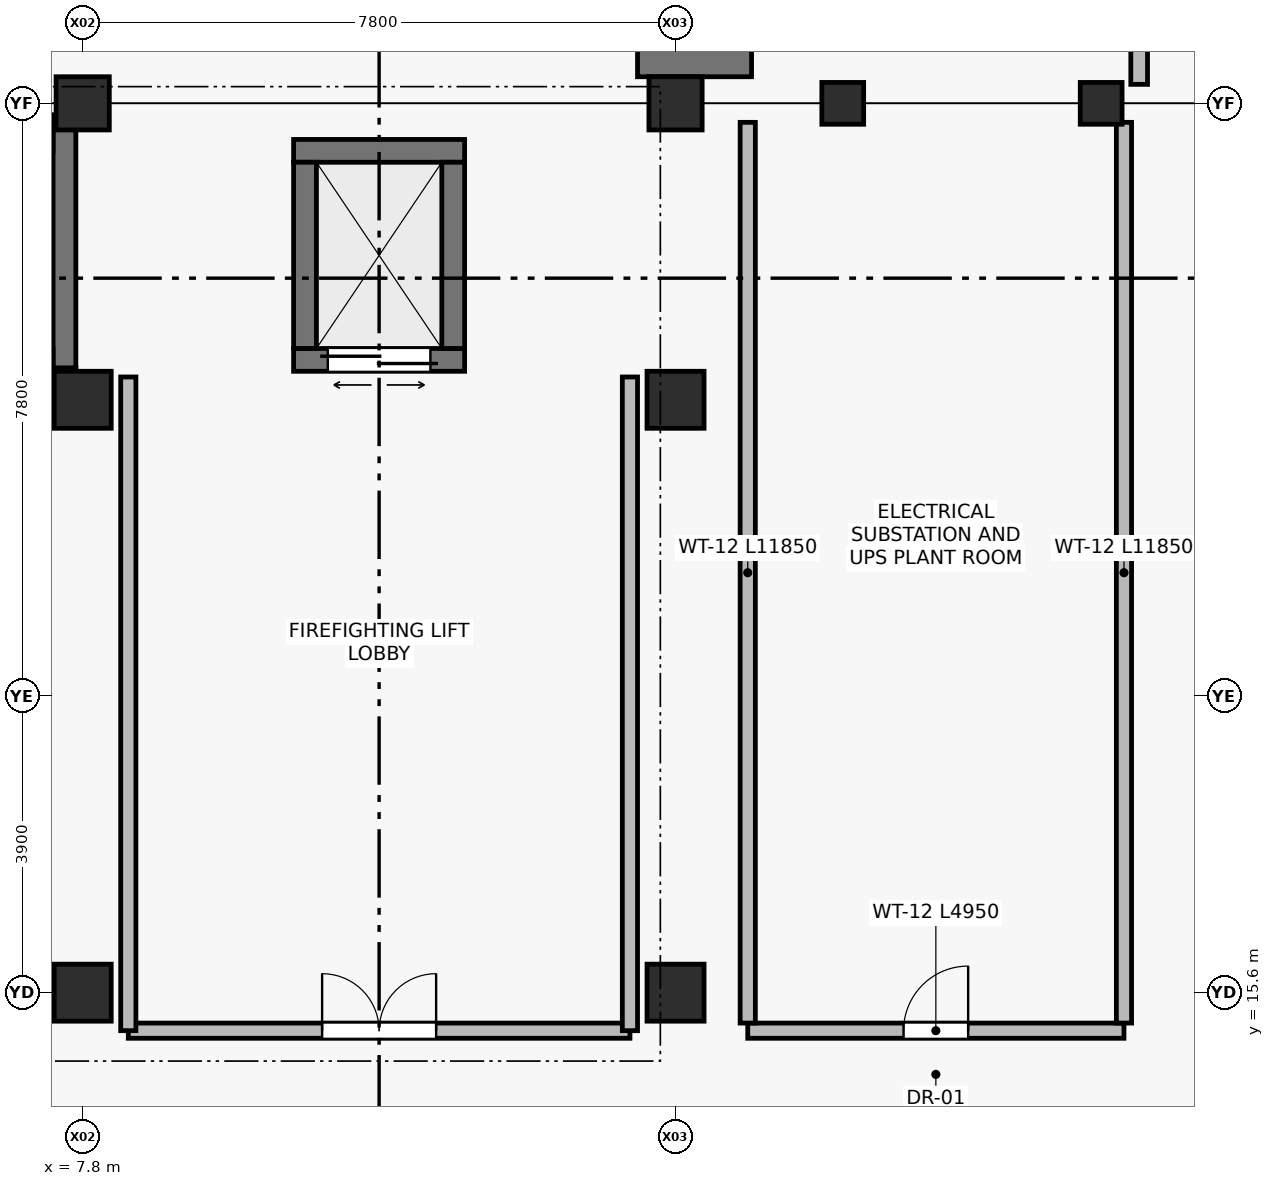
"""IFC4 building model, lengths in metres.
Left out: names, types, materials, properties, quantities, classifications, styles, units other than length and angle.
Written with IfcOpenShell. Run it as: python <this file> out.ifc"""

import sys

from ifc_helpers import new_model, si_unit, direction, frame, frame_2d, origin, origin_2d, place, context, subcontext, project, spatial, rectangle, extrude, element, fill, save


model = new_model("IFC4")
c1 = context("Model", 3, precision=1e-05, world=origin(), true_north=direction((0.0, 1.0)))
c2 = subcontext(c1, "Body", "Model", "MODEL_VIEW")
j1 = project(units=[si_unit("LENGTHUNIT", "METRE"), si_unit("PLANEANGLEUNIT", "RADIAN")], contexts=[c1])
p1 = place(None, origin())
s1 = spatial("IfcSite", under=j1, at=p1, CompositionType="ELEMENT")
p2 = place(p1, origin())
s2 = spatial("IfcBuilding", under=s1, at=p2, CompositionType="ELEMENT")
p3 = place(p2, frame((0.0, 0.0, -4.5)))
s3 = spatial("IfcBuildingStorey", under=s2, at=p3, CompositionType="ELEMENT", Elevation=-4.5)
for number, where, z_axis, x_axis in (
    (1, (7.8, 27.3, 0.0), (0.0, 0.0, 1.0), (1.0, 0.0, 0.0)),
    (2, (15.6, 27.3, 0.0), (0.0, 0.0, 1.0), (1.0, 0.0, 0.0)),
):
    element("IfcColumn", number, at=place(p3, frame(where, z_axis=z_axis, x_axis=x_axis)), inside=s3, PredefinedType="COLUMN", context=c2, shape_type="SweptSolid", body=[
        extrude(rectangle(XDim=0.7, YDim=0.7, at=origin_2d()), origin(), (0.0, 0.0, 1.0), 4.5),
    ])
for number, where, z_axis, x_axis in (
    (3, (7.8, 15.6, 0.0), (0.0, 0.0, 1.0), (1.0, 0.0, 0.0)),
    (4, (7.8, 23.4, 0.0), (0.0, 0.0, 1.0), (1.0, 0.0, 0.0)),
    (5, (15.6, 15.6, 0.0), (0.0, 0.0, 1.0), (1.0, 0.0, 0.0)),
    (6, (15.6, 23.4, 0.0), (0.0, 0.0, 1.0), (1.0, 0.0, 0.0)),
):
    element("IfcColumn", number, at=place(p3, frame(where, z_axis=z_axis, x_axis=x_axis)), inside=s3, PredefinedType="COLUMN", context=c2, shape_type="SweptSolid", body=[
        extrude(rectangle(XDim=0.75, YDim=0.75, at=origin_2d()), origin(), (0.0, 0.0, 1.0), 4.5),
    ])
for number, where, z_axis, x_axis in (
    (7, (17.8, 27.3, 0.0), (0.0, 0.0, 1.0), (1.0, 0.0, 0.0)),
    (8, (21.2, 27.3, 0.0), (0.0, 0.0, 1.0), (1.0, 0.0, 0.0)),
):
    element("IfcColumn", number, at=place(p3, frame(where, z_axis=z_axis, x_axis=x_axis)), inside=s3, PredefinedType="COLUMN", context=c2, shape_type="SweptSolid", body=[
        extrude(rectangle(XDim=0.55, YDim=0.55, at=origin_2d()), origin(), (0.0, 0.0, 1.0), 4.5),
    ])
for number, where, z_axis, x_axis in (
    (9, (7.21, 23.87, 0.0), (0.0, 0.0, 1.0), (1.0, 0.0, 0.0)),
    (10, (7.21, 26.87, 0.0), (0.0, 0.0, 1.0), (1.0, 0.0, 0.0)),
):
    element("IfcColumn", number, at=place(p3, frame(where, z_axis=z_axis, x_axis=x_axis)), inside=s3, PredefinedType="COLUMN", context=c2, shape_type="SweptSolid", body=[
        extrude(rectangle(XDim=0.4, YDim=0.4, at=origin_2d()), origin(), (0.0, 0.0, 1.0), 4.5),
    ])
p4 = place(p3, frame((0.15, 23.67, 0.0), z_axis=(0.0, 0.0, 1.0), x_axis=(1.0, 0.0, 0.0)))
e11 = element("IfcWall", 11, at=p4, inside=s3, PredefinedType="SHEAR", context=c2, shape_type="SweptSolid", body=[
    extrude(rectangle(XDim=7.56, YDim=0.3, at=frame_2d((3.78, 0.0))), origin(), (0.0, 0.0, 1.0), 4.2),
])
p5 = place(p4, frame((0.56, 0.0, 0.0)))
e12 = element("IfcOpeningElement", 12, at=p5, cuts=e11, PredefinedType="OPENING", context=c2, shape_type="SweptSolid", body=[
    extrude(rectangle(XDim=1.4, YDim=2.2, at=frame_2d((0.7, 1.1))), frame((0.0, 0.16, 0.0), z_axis=(0.0, -1.0, 0.0), x_axis=(1.0, 0.0, 0.0)), (0.0, 0.0, 1.0), 0.32),
])
p6 = place(p3, frame((7.56, 23.82, 0.0), z_axis=(0.0, 0.0, 1.0), x_axis=(0.0, 1.0, 0.0)))
e13 = element("IfcWall", 13, at=p6, inside=s3, PredefinedType="SHEAR", context=c2, shape_type="SweptSolid", body=[
    extrude(rectangle(XDim=3.33, YDim=0.3, at=frame_2d((1.665, 0.0))), origin(), (0.0, 0.0, 1.0), 4.2),
])
p7 = place(p3, frame((10.575, 23.925, 0.0), z_axis=(0.0, 0.0, 1.0), x_axis=(1.0, 0.0, 0.0)))
e14 = element("IfcWall", 14, at=p7, inside=s3, PredefinedType="SHEAR", context=c2, shape_type="SweptSolid", body=[
    extrude(rectangle(XDim=2.25, YDim=0.3, at=frame_2d((1.125, 0.0))), origin(), (0.0, 0.0, 1.0), 4.2),
])
p8 = place(p7, frame((0.45, 0.0, 0.0)))
e15 = element("IfcOpeningElement", 15, at=p8, cuts=e14, PredefinedType="OPENING", context=c2, shape_type="SweptSolid", body=[
    extrude(rectangle(XDim=1.35, YDim=2.3, at=frame_2d((0.675, 1.15))), frame((0.0, 0.16, 0.0), z_axis=(0.0, -1.0, 0.0), x_axis=(1.0, 0.0, 0.0)), (0.0, 0.0, 1.0), 0.32),
])
p9 = place(p3, frame((12.825, 26.675, 0.0), z_axis=(0.0, 0.0, 1.0), x_axis=(-1.0, 0.0, 0.0)))
e16 = element("IfcWall", 16, at=p9, inside=s3, PredefinedType="SHEAR", context=c2, shape_type="SweptSolid", body=[
    extrude(rectangle(XDim=2.25, YDim=0.3, at=frame_2d((1.125, 0.0))), origin(), (0.0, 0.0, 1.0), 4.2),
])
for number, where, z_axis, x_axis in (
    (17, (10.725, 26.525, 0.0), (0.0, 0.0, 1.0), (0.0, -1.0, 0.0)),
    (18, (12.675, 24.075, 0.0), (0.0, 0.0, 1.0), (0.0, 1.0, 0.0)),
):
    element("IfcWall", number, at=place(p3, frame(where, z_axis=z_axis, x_axis=x_axis)), inside=s3, PredefinedType="SHEAR", context=c2, shape_type="SweptSolid", body=[
        extrude(rectangle(XDim=2.45, YDim=0.3, at=frame_2d((1.225, 0.0))), origin(), (0.0, 0.0, 1.0), 4.2),
    ])
p10 = place(p3, frame((8.4, 15.1, 0.0), z_axis=(0.0, 0.0, 1.0), x_axis=(1.0, 0.0, 0.0)))
e19 = element("IfcWall", 19, at=p10, inside=s3, PredefinedType="SOLIDWALL", context=c2, shape_type="SweptSolid", body=[
    extrude(rectangle(XDim=6.6, YDim=0.2, at=frame_2d((3.3, 0.0))), origin(), (0.0, 0.0, 1.0), 4.2),
])
p11 = place(p10, frame((2.55, 0.0, 0.0)))
e20 = element("IfcOpeningElement", 20, at=p11, cuts=e19, PredefinedType="OPENING", context=c2, shape_type="SweptSolid", body=[
    extrude(rectangle(XDim=1.5, YDim=2.2, at=frame_2d((0.75, 1.1))), frame((0.0, 0.11, 0.0), z_axis=(0.0, -1.0, 0.0), x_axis=(1.0, 0.0, 0.0)), (0.0, 0.0, 1.0), 0.22),
])
for number, where, z_axis, x_axis in (
    (21, (8.4, 23.7, 0.0), (0.0, 0.0, 1.0), (0.0, -1.0, 0.0)),
    (22, (15.0, 15.1, 0.0), (0.0, 0.0, 1.0), (0.0, 1.0, 0.0)),
):
    element("IfcWall", number, at=place(p3, frame(where, z_axis=z_axis, x_axis=x_axis)), inside=s3, PredefinedType="SOLIDWALL", context=c2, shape_type="SweptSolid", body=[
        extrude(rectangle(XDim=8.6, YDim=0.2, at=frame_2d((4.3, 0.0))), origin(), (0.0, 0.0, 1.0), 4.2),
    ])
p12 = place(p3, frame((16.55, 15.1, 0.0), z_axis=(0.0, 0.0, 1.0), x_axis=(1.0, 0.0, 0.0)))
e23 = element("IfcWall", 23, at=p12, inside=s3, PredefinedType="SOLIDWALL", context=c2, shape_type="SweptSolid", body=[
    extrude(rectangle(XDim=4.95, YDim=0.2, at=frame_2d((2.475, 0.0))), origin(), (0.0, 0.0, 1.0), 4.2),
])
p13 = place(p12, frame((2.05, 0.0, 0.0)))
e24 = element("IfcOpeningElement", 24, at=p13, cuts=e23, PredefinedType="OPENING", context=c2, shape_type="SweptSolid", body=[
    extrude(rectangle(XDim=0.85, YDim=2.1, at=frame_2d((0.425, 1.05))), frame((0.0, 0.11, 0.0), z_axis=(0.0, -1.0, 0.0), x_axis=(1.0, 0.0, 0.0)), (0.0, 0.0, 1.0), 0.22),
])
p14 = place(p3, frame((15.85, 27.65, 0.0), z_axis=(0.0, 0.0, 1.0), x_axis=(0.0, 1.0, 0.0)))
e25 = element("IfcWall", 25, at=p14, inside=s3, PredefinedType="SOLIDWALL", context=c2, shape_type="SweptSolid", body=[
    extrude(rectangle(XDim=7.1, YDim=1.5, at=frame_2d((3.55, 0.0))), origin(), (0.0, 0.0, 1.0), 4.12),
])
p15 = place(p3, frame((21.7, 27.55, 0.0), z_axis=(0.0, 0.0, 1.0), x_axis=(0.0, 1.0, 0.0)))
e26 = element("IfcWall", 26, at=p15, inside=s3, PredefinedType="PARTITIONING", context=c2, shape_type="SweptSolid", body=[
    extrude(rectangle(XDim=19.24, YDim=0.22, at=frame_2d((9.62, 0.0))), origin(), (0.0, 0.0, 1.0), 4.12),
])
for number, where, z_axis, x_axis in (
    (27, (16.55, 15.2, 0.0), (0.0, 0.0, 1.0), (0.0, 1.0, 0.0)),
    (28, (21.5, 15.2, 0.0), (0.0, 0.0, 1.0), (0.0, 1.0, 0.0)),
):
    element("IfcWall", number, at=place(p3, frame(where, z_axis=z_axis, x_axis=x_axis)), inside=s3, PredefinedType="SOLIDWALL", context=c2, shape_type="SweptSolid", body=[
        extrude(rectangle(XDim=11.85, YDim=0.2, at=frame_2d((5.925, 0.0))), origin(), (0.0, 0.0, 1.0), 4.2),
    ])
p16 = place(p8, origin())
e29 = element("IfcDoor", 29, at=p16, inside=s3, OperationType="DOUBLE_DOOR_SLIDING", PredefinedType="DOOR", context=c2, shape_type="SweptSolid", body=[
    extrude(rectangle(XDim=1.35, YDim=2.3, at=frame_2d((0.675, 1.15))), frame((0.0, 0.025, 0.0), z_axis=(0.0, -1.0, 0.0), x_axis=(1.0, 0.0, 0.0)), (0.0, 0.0, 1.0), 0.05),
])
fill(e15, e29)
p17 = place(p11, origin())
e30 = element("IfcDoor", 30, at=p17, inside=s3, OperationType="DOUBLE_DOOR_SINGLE_SWING", PredefinedType="DOOR", context=c2, shape_type="SweptSolid", body=[
    extrude(rectangle(XDim=1.5, YDim=2.2, at=frame_2d((0.75, 1.1))), frame((0.0, 0.025, 0.0), z_axis=(0.0, -1.0, 0.0), x_axis=(1.0, 0.0, 0.0)), (0.0, 0.0, 1.0), 0.05),
])
fill(e20, e30)
p18 = place(p13, origin())
e31 = element("IfcDoor", 31, at=p18, inside=s3, OperationType="SINGLE_SWING_RIGHT", PredefinedType="DOOR", context=c2, shape_type="SweptSolid", body=[
    extrude(rectangle(XDim=0.85, YDim=2.1, at=frame_2d((0.425, 1.05))), frame((0.0, 0.025, 0.0), z_axis=(0.0, -1.0, 0.0), x_axis=(1.0, 0.0, 0.0)), (0.0, 0.0, 1.0), 0.05),
])
fill(e24, e31)
save(model, sys.argv[1])
